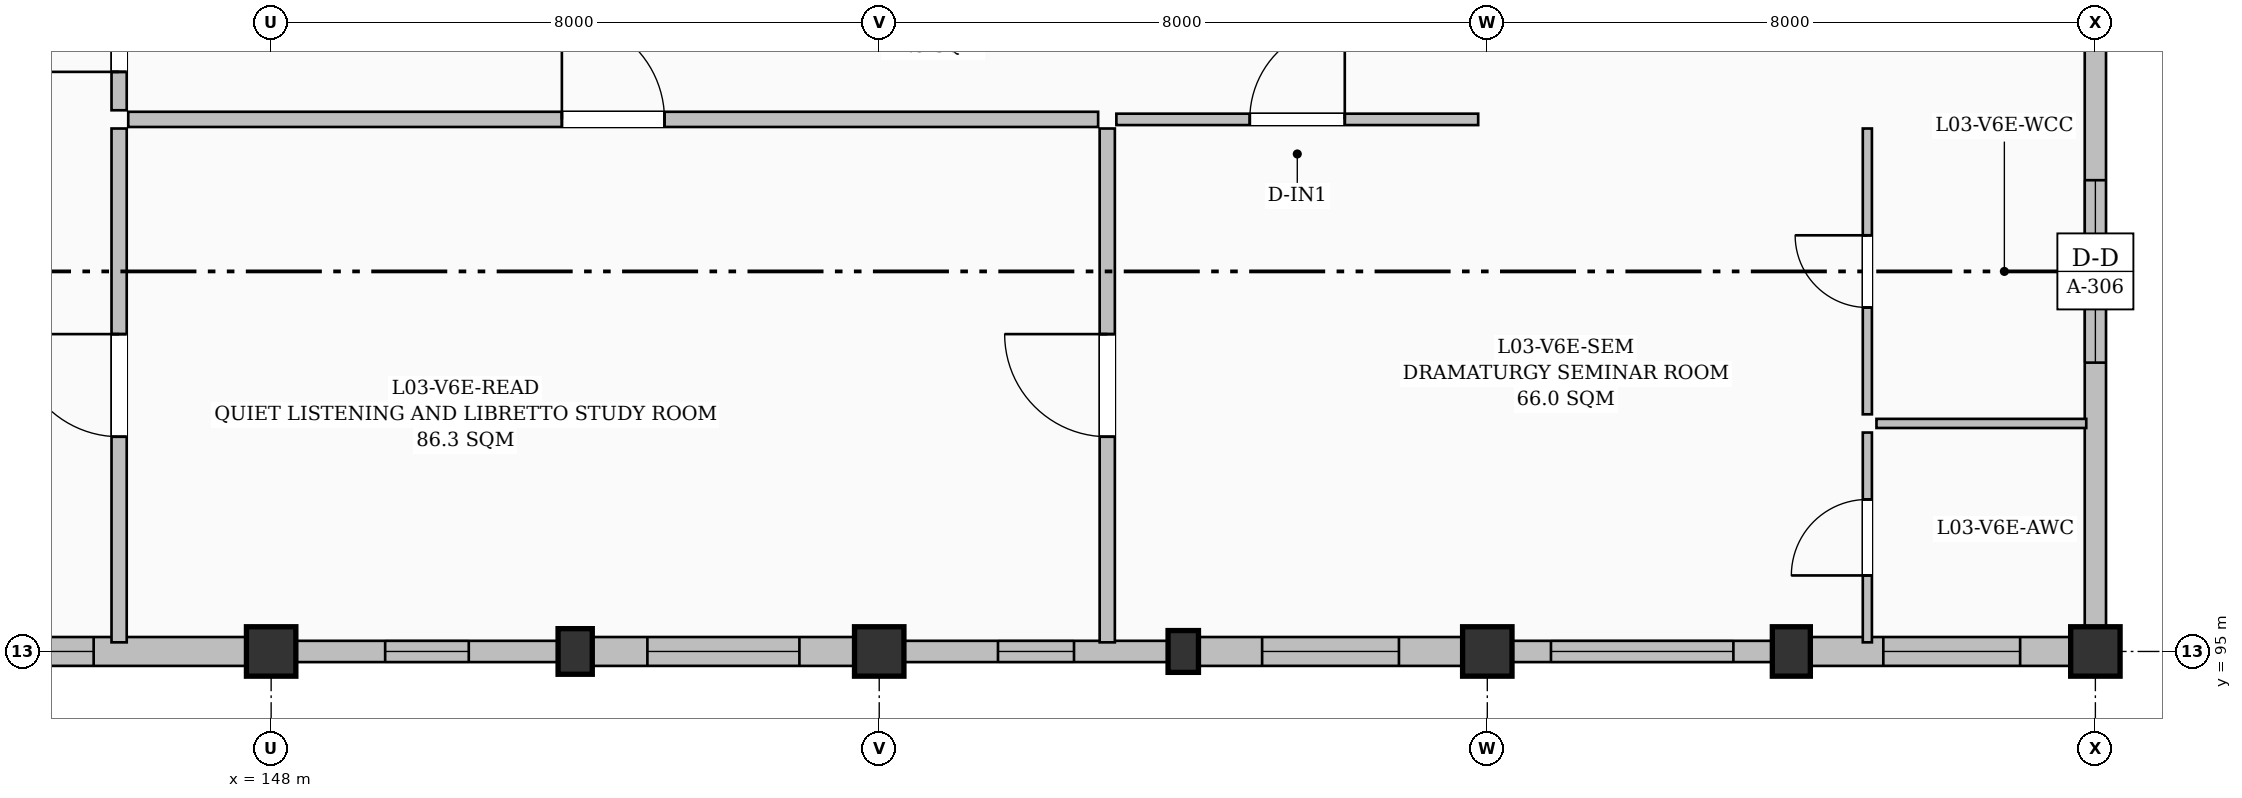
"""IFC4 building model, lengths in metres.
Left out: names, types, materials, properties, quantities, classifications, styles, units other than length and angle.
Written with IfcOpenShell. Run it as: python <this file> out.ifc"""

import sys

from ifc_helpers import new_model, si_unit, direction, frame, frame_2d, origin, origin_2d, place, context, subcontext, project, spatial, rectangle, extrude, element, fill, save


model = new_model("IFC4")
c1 = context("Model", 3, precision=1e-05, world=origin(), true_north=direction((0.0, 1.0)))
c2 = subcontext(c1, "Body", "Model", "MODEL_VIEW")
j1 = project(units=[si_unit("LENGTHUNIT", "METRE"), si_unit("PLANEANGLEUNIT", "RADIAN")], contexts=[c1])
p1 = place(None, origin())
s1 = spatial("IfcSite", under=j1, at=p1, CompositionType="ELEMENT")
p2 = place(p1, origin())
s2 = spatial("IfcBuilding", under=s1, at=p2, CompositionType="ELEMENT")
p3 = place(p2, frame((0.0, 0.0, 13.8)))
s3 = spatial("IfcBuildingStorey", under=s2, at=p3, CompositionType="ELEMENT", Elevation=13.8)
p4 = place(p3, frame((148.0, 95.0, 0.0), z_axis=(0.0, 0.0, 1.0), x_axis=(1.0, 0.0, 0.0)))
e1 = element("IfcColumn", 1, at=p4, inside=s3, PredefinedType="COLUMN", context=c2, shape_type="SweptSolid", body=[
    extrude(rectangle(XDim=0.65, YDim=0.65, at=origin_2d()), origin(), (0.0, 0.0, 1.0), 4.5),
])
p5 = place(p3, frame((152.0, 95.0, 0.0), z_axis=(0.0, 0.0, 1.0), x_axis=(1.0, 0.0, 0.0)))
e2 = element("IfcColumn", 2, at=p5, inside=s3, PredefinedType="PILASTER", context=c2, shape_type="SweptSolid", body=[
    extrude(rectangle(XDim=0.45, YDim=0.6, at=origin_2d()), origin(), (0.0, 0.0, 1.0), 4.5),
])
p6 = place(p3, frame((156.0, 95.0, 0.0), z_axis=(0.0, 0.0, 1.0), x_axis=(1.0, 0.0, 0.0)))
e3 = element("IfcColumn", 3, at=p6, inside=s3, PredefinedType="COLUMN", context=c2, shape_type="SweptSolid", body=[
    extrude(rectangle(XDim=0.65, YDim=0.65, at=origin_2d()), origin(), (0.0, 0.0, 1.0), 4.5),
])
p7 = place(p3, frame((160.0, 95.0, 0.0), z_axis=(0.0, 0.0, 1.0), x_axis=(1.0, 0.0, 0.0)))
e4 = element("IfcColumn", 4, at=p7, inside=s3, PredefinedType="PILASTER", context=c2, shape_type="SweptSolid", body=[
    extrude(rectangle(XDim=0.4, YDim=0.55, at=origin_2d()), origin(), (0.0, 0.0, 1.0), 4.5),
])
p8 = place(p3, frame((164.0, 95.0, 0.0), z_axis=(0.0, 0.0, 1.0), x_axis=(1.0, 0.0, 0.0)))
e5 = element("IfcColumn", 5, at=p8, inside=s3, PredefinedType="COLUMN", context=c2, shape_type="SweptSolid", body=[
    extrude(rectangle(XDim=0.65, YDim=0.65, at=origin_2d()), origin(), (0.0, 0.0, 1.0), 4.5),
])
p9 = place(p3, frame((168.0, 95.0, 0.0), z_axis=(0.0, 0.0, 1.0), x_axis=(1.0, 0.0, 0.0)))
e6 = element("IfcColumn", 6, at=p9, inside=s3, PredefinedType="PILASTER", context=c2, shape_type="SweptSolid", body=[
    extrude(rectangle(XDim=0.5, YDim=0.65, at=origin_2d()), origin(), (0.0, 0.0, 1.0), 4.5),
])
p10 = place(p3, frame((172.0, 95.0, 0.0), z_axis=(0.0, 0.0, 1.0), x_axis=(1.0, 0.0, 0.0)))
e7 = element("IfcColumn", 7, at=p10, inside=s3, PredefinedType="COLUMN", context=c2, shape_type="SweptSolid", body=[
    extrude(rectangle(XDim=0.65, YDim=0.65, at=origin_2d()), origin(), (0.0, 0.0, 1.0), 4.5),
])
p11 = place(p3, frame((172.0, 104.675, 0.0), z_axis=(0.0, 0.0, 1.0), x_axis=(0.0, -1.0, 0.0)))
e8 = element("IfcWall", 8, at=p11, inside=s3, PredefinedType="SOLIDWALL", context=c2, shape_type="SweptSolid", body=[
    extrude(rectangle(XDim=9.35, YDim=0.28, at=frame_2d((4.675, 0.0))), origin(), (0.0, 0.0, 1.0), 3.705),
])
p12 = place(p11, frame((3.475, 0.0, 0.95)))
e9 = element("IfcOpeningElement", 9, at=p12, cuts=e8, PredefinedType="OPENING", context=c2, shape_type="SweptSolid", body=[
    extrude(rectangle(XDim=2.4, YDim=1.8, at=frame_2d((1.2, 0.9))), frame((0.0, 0.15, 0.0), z_axis=(0.0, -1.0, 0.0), x_axis=(1.0, 0.0, 0.0)), (0.0, 0.0, 1.0), 0.3),
])
p13 = place(p3, frame((171.675, 95.0, 0.0), z_axis=(0.0, 0.0, 1.0), x_axis=(-1.0, 0.0, 0.0)))
e10 = element("IfcWall", 10, at=p13, inside=s3, PredefinedType="SOLIDWALL", context=c2, shape_type="SweptSolid", body=[
    extrude(rectangle(XDim=3.425, YDim=0.38, at=frame_2d((1.712, 0.0))), origin(), (0.0, 0.0, 1.0), 3.955),
])
p14 = place(p13, frame((0.665, 0.0, 0.95)))
e11 = element("IfcOpeningElement", 11, at=p14, cuts=e10, PredefinedType="OPENING", context=c2, shape_type="SweptSolid", body=[
    extrude(rectangle(XDim=1.8, YDim=1.8, at=frame_2d((0.9, 0.9))), frame((0.0, 0.2, 0.0), z_axis=(0.0, -1.0, 0.0), x_axis=(1.0, 0.0, 0.0)), (0.0, 0.0, 1.0), 0.4),
])
p15 = place(p3, frame((167.75, 95.0, 0.0), z_axis=(0.0, 0.0, 1.0), x_axis=(-1.0, 0.0, 0.0)))
e12 = element("IfcWall", 12, at=p15, inside=s3, PredefinedType="SOLIDWALL", context=c2, shape_type="SweptSolid", body=[
    extrude(rectangle(XDim=3.425, YDim=0.28, at=frame_2d((1.712, 0.0))), origin(), (0.0, 0.0, 1.0), 3.955),
])
p16 = place(p15, frame((0.512, 0.0, 0.95)))
e13 = element("IfcOpeningElement", 13, at=p16, cuts=e12, PredefinedType="OPENING", context=c2, shape_type="SweptSolid", body=[
    extrude(rectangle(XDim=2.4, YDim=1.8, at=frame_2d((1.2, 0.9))), frame((0.0, 0.15, 0.0), z_axis=(0.0, -1.0, 0.0), x_axis=(1.0, 0.0, 0.0)), (0.0, 0.0, 1.0), 0.3),
])
p17 = place(p3, frame((163.675, 95.0, 0.0), z_axis=(0.0, 0.0, 1.0), x_axis=(-1.0, 0.0, 0.0)))
e14 = element("IfcWall", 14, at=p17, inside=s3, PredefinedType="SOLIDWALL", context=c2, shape_type="SweptSolid", body=[
    extrude(rectangle(XDim=3.475, YDim=0.38, at=frame_2d((1.738, 0.0))), origin(), (0.0, 0.0, 1.0), 3.655),
])
p18 = place(p17, frame((0.837, 0.0, 0.95)))
e15 = element("IfcOpeningElement", 15, at=p18, cuts=e14, PredefinedType="OPENING", context=c2, shape_type="SweptSolid", body=[
    extrude(rectangle(XDim=1.8, YDim=1.5, at=frame_2d((0.9, 0.75))), frame((0.0, 0.2, 0.0), z_axis=(0.0, -1.0, 0.0), x_axis=(1.0, 0.0, 0.0)), (0.0, 0.0, 1.0), 0.4),
])
p19 = place(p3, frame((159.8, 95.0, 0.0), z_axis=(0.0, 0.0, 1.0), x_axis=(-1.0, 0.0, 0.0)))
e16 = element("IfcWall", 16, at=p19, inside=s3, PredefinedType="SOLIDWALL", context=c2, shape_type="SweptSolid", body=[
    extrude(rectangle(XDim=3.475, YDim=0.28, at=frame_2d((1.738, 0.0))), origin(), (0.0, 0.0, 1.0), 3.655),
])
p20 = place(p19, frame((1.238, 0.0, 0.95)))
e17 = element("IfcOpeningElement", 17, at=p20, cuts=e16, PredefinedType="OPENING", context=c2, shape_type="SweptSolid", body=[
    extrude(rectangle(XDim=1.0, YDim=1.4, at=frame_2d((0.5, 0.7))), frame((0.0, 0.15, 0.0), z_axis=(0.0, -1.0, 0.0), x_axis=(1.0, 0.0, 0.0)), (0.0, 0.0, 1.0), 0.3),
])
p21 = place(p3, frame((155.675, 95.0, 0.0), z_axis=(0.0, 0.0, 1.0), x_axis=(-1.0, 0.0, 0.0)))
e18 = element("IfcWall", 18, at=p21, inside=s3, PredefinedType="SOLIDWALL", context=c2, shape_type="SweptSolid", body=[
    extrude(rectangle(XDim=3.45, YDim=0.38, at=frame_2d((1.725, 0.0))), origin(), (0.0, 0.0, 1.0), 3.705),
])
p22 = place(p21, frame((0.725, 0.0, 0.95)))
e19 = element("IfcOpeningElement", 19, at=p22, cuts=e18, PredefinedType="OPENING", context=c2, shape_type="SweptSolid", body=[
    extrude(rectangle(XDim=2.0, YDim=1.2, at=frame_2d((1.0, 0.6))), frame((0.0, 0.2, 0.0), z_axis=(0.0, -1.0, 0.0), x_axis=(1.0, 0.0, 0.0)), (0.0, 0.0, 1.0), 0.4),
])
p23 = place(p3, frame((151.775, 95.0, 0.0), z_axis=(0.0, 0.0, 1.0), x_axis=(-1.0, 0.0, 0.0)))
e20 = element("IfcWall", 20, at=p23, inside=s3, PredefinedType="SOLIDWALL", context=c2, shape_type="SweptSolid", body=[
    extrude(rectangle(XDim=3.45, YDim=0.28, at=frame_2d((1.725, 0.0))), origin(), (0.0, 0.0, 1.0), 3.705),
])
p24 = place(p23, frame((1.175, 0.0, 0.95)))
e21 = element("IfcOpeningElement", 21, at=p24, cuts=e20, PredefinedType="OPENING", context=c2, shape_type="SweptSolid", body=[
    extrude(rectangle(XDim=1.1, YDim=2.0, at=frame_2d((0.55, 1.0))), frame((0.0, 0.15, 0.0), z_axis=(0.0, -1.0, 0.0), x_axis=(1.0, 0.0, 0.0)), (0.0, 0.0, 1.0), 0.3),
])
p25 = place(p3, frame((147.675, 95.0, 0.0), z_axis=(0.0, 0.0, 1.0), x_axis=(-1.0, 0.0, 0.0)))
e22 = element("IfcWall", 22, at=p25, inside=s3, PredefinedType="SOLIDWALL", context=c2, shape_type="SweptSolid", body=[
    extrude(rectangle(XDim=3.425, YDim=0.38, at=frame_2d((1.712, 0.0))), origin(), (0.0, 0.0, 1.0), 3.755),
])
p26 = place(p25, frame((2.01, 0.0, 0.95)))
e23 = element("IfcOpeningElement", 23, at=p26, cuts=e22, PredefinedType="OPENING", context=c2, shape_type="SweptSolid", body=[
    extrude(rectangle(XDim=1.1, YDim=2.0, at=frame_2d((0.55, 1.0))), frame((0.0, 0.2, 0.0), z_axis=(0.0, -1.0, 0.0), x_axis=(1.0, 0.0, 0.0)), (0.0, 0.0, 1.0), 0.4),
])
p27 = place(p3, frame((146.0, 95.12, 0.0), z_axis=(0.0, 0.0, 1.0), x_axis=(0.0, 1.0, 0.0)))
e24 = element("IfcWall", 24, at=p27, inside=s3, PredefinedType="PARTITIONING", context=c2, shape_type="SweptSolid", body=[
    extrude(rectangle(XDim=6.76, YDim=0.2, at=frame_2d((3.38, 0.0))), origin(), (0.0, 0.0, 1.0), 4.27),
])
p28 = place(p27, frame((2.705, 0.0, 0.0)))
e25 = element("IfcOpeningElement", 25, at=p28, cuts=e24, PredefinedType="OPENING", context=c2, shape_type="SweptSolid", body=[
    extrude(rectangle(XDim=1.35, YDim=2.2, at=frame_2d((0.675, 1.1))), frame((0.0, 0.11, 0.0), z_axis=(0.0, -1.0, 0.0), x_axis=(1.0, 0.0, 0.0)), (0.0, 0.0, 1.0), 0.22),
])
p29 = place(p3, frame((146.0, 102.12, 0.0), z_axis=(0.0, 0.0, 1.0), x_axis=(0.0, 1.0, 0.0)))
e26 = element("IfcWall", 26, at=p29, inside=s3, PredefinedType="PARTITIONING", context=c2, shape_type="SweptSolid", body=[
    extrude(rectangle(XDim=2.36, YDim=0.2, at=frame_2d((1.18, 0.0))), origin(), (0.0, 0.0, 1.0), 4.27),
])
p30 = place(p29, frame((0.505, 0.0, 0.0)))
e27 = element("IfcOpeningElement", 27, at=p30, cuts=e26, PredefinedType="OPENING", context=c2, shape_type="SweptSolid", body=[
    extrude(rectangle(XDim=1.35, YDim=2.2, at=frame_2d((0.675, 1.1))), frame((0.0, 0.11, 0.0), z_axis=(0.0, -1.0, 0.0), x_axis=(1.0, 0.0, 0.0)), (0.0, 0.0, 1.0), 0.22),
])
p31 = place(p3, frame((159.0, 95.12, 0.0), z_axis=(0.0, 0.0, 1.0), x_axis=(0.0, 1.0, 0.0)))
e28 = element("IfcWall", 28, at=p31, inside=s3, PredefinedType="PARTITIONING", context=c2, shape_type="SweptSolid", body=[
    extrude(rectangle(XDim=6.76, YDim=0.2, at=frame_2d((3.38, 0.0))), origin(), (0.0, 0.0, 1.0), 4.27),
])
p32 = place(p31, frame((2.705, 0.0, 0.0)))
e29 = element("IfcOpeningElement", 29, at=p32, cuts=e28, PredefinedType="OPENING", context=c2, shape_type="SweptSolid", body=[
    extrude(rectangle(XDim=1.35, YDim=2.2, at=frame_2d((0.675, 1.1))), frame((0.0, 0.11, 0.0), z_axis=(0.0, -1.0, 0.0), x_axis=(1.0, 0.0, 0.0)), (0.0, 0.0, 1.0), 0.22),
])
p33 = place(p3, frame((146.12, 102.0, 0.0), z_axis=(0.0, 0.0, 1.0), x_axis=(1.0, 0.0, 0.0)))
e30 = element("IfcWall", 30, at=p33, inside=s3, PredefinedType="PARTITIONING", context=c2, shape_type="SweptSolid", body=[
    extrude(rectangle(XDim=12.76, YDim=0.2, at=frame_2d((6.38, 0.0))), origin(), (0.0, 0.0, 1.0), 3.895),
])
p34 = place(p33, frame((5.705, 0.0, 0.0)))
e31 = element("IfcOpeningElement", 31, at=p34, cuts=e30, PredefinedType="OPENING", context=c2, shape_type="SweptSolid", body=[
    extrude(rectangle(XDim=1.35, YDim=2.2, at=frame_2d((0.675, 1.1))), frame((0.0, 0.11, 0.0), z_axis=(0.0, -1.0, 0.0), x_axis=(1.0, 0.0, 0.0)), (0.0, 0.0, 1.0), 0.22),
])
p35 = place(p3, frame((159.12, 102.0, 0.0), z_axis=(0.0, 0.0, 1.0), x_axis=(1.0, 0.0, 0.0)))
e32 = element("IfcWall", 32, at=p35, inside=s3, PredefinedType="PARTITIONING", context=c2, shape_type="SweptSolid", body=[
    extrude(rectangle(XDim=4.76, YDim=0.15, at=frame_2d((2.38, 0.0))), origin(), (0.0, 0.0, 1.0), 3.925),
])
p36 = place(p35, frame((1.755, 0.0, 0.0)))
e33 = element("IfcOpeningElement", 33, at=p36, cuts=e32, PredefinedType="OPENING", context=c2, shape_type="SweptSolid", body=[
    extrude(rectangle(XDim=1.25, YDim=2.15, at=frame_2d((0.625, 1.075))), frame((0.0, 0.085, 0.0), z_axis=(0.0, -1.0, 0.0), x_axis=(1.0, 0.0, 0.0)), (0.0, 0.0, 1.0), 0.17),
])
p37 = place(p3, frame((169.0, 95.12, 0.0), z_axis=(0.0, 0.0, 1.0), x_axis=(0.0, 1.0, 0.0)))
e34 = element("IfcWall", 34, at=p37, inside=s3, PredefinedType="PARTITIONING", context=c2, shape_type="SweptSolid", body=[
    extrude(rectangle(XDim=2.76, YDim=0.12, at=frame_2d((1.38, 0.0))), origin(), (0.0, 0.0, 1.0), 4.27),
])
p38 = place(p37, frame((0.88, 0.0, 0.0)))
e35 = element("IfcOpeningElement", 35, at=p38, cuts=e34, PredefinedType="OPENING", context=c2, shape_type="SweptSolid", body=[
    extrude(rectangle(XDim=1.0, YDim=2.1, at=frame_2d((0.5, 1.05))), frame((0.0, 0.07, 0.0), z_axis=(0.0, -1.0, 0.0), x_axis=(1.0, 0.0, 0.0)), (0.0, 0.0, 1.0), 0.14),
])
p39 = place(p3, frame((169.0, 98.12, 0.0), z_axis=(0.0, 0.0, 1.0), x_axis=(0.0, 1.0, 0.0)))
e36 = element("IfcWall", 36, at=p39, inside=s3, PredefinedType="PARTITIONING", context=c2, shape_type="SweptSolid", body=[
    extrude(rectangle(XDim=3.76, YDim=0.12, at=frame_2d((1.88, 0.0))), origin(), (0.0, 0.0, 1.0), 4.27),
])
p40 = place(p39, frame((1.405, 0.0, 0.0)))
e37 = element("IfcOpeningElement", 37, at=p40, cuts=e36, PredefinedType="OPENING", context=c2, shape_type="SweptSolid", body=[
    extrude(rectangle(XDim=0.95, YDim=2.1, at=frame_2d((0.475, 1.05))), frame((0.0, 0.07, 0.0), z_axis=(0.0, -1.0, 0.0), x_axis=(1.0, 0.0, 0.0)), (0.0, 0.0, 1.0), 0.14),
])
p41 = place(p3, frame((169.12, 98.0, 0.0), z_axis=(0.0, 0.0, 1.0), x_axis=(1.0, 0.0, 0.0)))
e38 = element("IfcWall", 38, at=p41, inside=s3, PredefinedType="PARTITIONING", context=c2, shape_type="SweptSolid", body=[
    extrude(rectangle(XDim=2.76, YDim=0.12, at=frame_2d((1.38, 0.0))), origin(), (0.0, 0.0, 1.0), 3.855),
])
p42 = place(p12, origin())
e39 = element("IfcWindow", 39, at=p42, inside=s3, PartitioningType="TRIPLE_PANEL_VERTICAL", PredefinedType="WINDOW", context=c2, shape_type="SweptSolid", body=[
    extrude(rectangle(XDim=2.4, YDim=1.8, at=frame_2d((1.2, 0.9))), frame((0.0, 0.03, 0.0), z_axis=(0.0, -1.0, 0.0), x_axis=(1.0, 0.0, 0.0)), (0.0, 0.0, 1.0), 0.06),
])
fill(e9, e39)
p43 = place(p14, origin())
e40 = element("IfcWindow", 40, at=p43, inside=s3, PartitioningType="DOUBLE_PANEL_VERTICAL", PredefinedType="WINDOW", context=c2, shape_type="SweptSolid", body=[
    extrude(rectangle(XDim=1.8, YDim=1.8, at=frame_2d((0.9, 0.9))), frame((0.0, 0.03, 0.0), z_axis=(0.0, -1.0, 0.0), x_axis=(1.0, 0.0, 0.0)), (0.0, 0.0, 1.0), 0.06),
])
fill(e11, e40)
p44 = place(p16, origin())
e41 = element("IfcWindow", 41, at=p44, inside=s3, PartitioningType="TRIPLE_PANEL_VERTICAL", PredefinedType="WINDOW", context=c2, shape_type="SweptSolid", body=[
    extrude(rectangle(XDim=2.4, YDim=1.8, at=frame_2d((1.2, 0.9))), frame((0.0, 0.03, 0.0), z_axis=(0.0, -1.0, 0.0), x_axis=(1.0, 0.0, 0.0)), (0.0, 0.0, 1.0), 0.06),
])
fill(e13, e41)
p45 = place(p18, origin())
e42 = element("IfcWindow", 42, at=p45, inside=s3, PartitioningType="DOUBLE_PANEL_VERTICAL", PredefinedType="WINDOW", context=c2, shape_type="SweptSolid", body=[
    extrude(rectangle(XDim=1.8, YDim=1.5, at=frame_2d((0.9, 0.75))), frame((0.0, 0.03, 0.0), z_axis=(0.0, -1.0, 0.0), x_axis=(1.0, 0.0, 0.0)), (0.0, 0.0, 1.0), 0.06),
])
fill(e15, e42)
p46 = place(p20, origin())
e43 = element("IfcWindow", 43, at=p46, inside=s3, PartitioningType="SINGLE_PANEL", PredefinedType="WINDOW", context=c2, shape_type="SweptSolid", body=[
    extrude(rectangle(XDim=1.0, YDim=1.4, at=frame_2d((0.5, 0.7))), frame((0.0, 0.03, 0.0), z_axis=(0.0, -1.0, 0.0), x_axis=(1.0, 0.0, 0.0)), (0.0, 0.0, 1.0), 0.06),
])
fill(e17, e43)
p47 = place(p22, origin())
e44 = element("IfcWindow", 44, at=p47, inside=s3, PartitioningType="DOUBLE_PANEL_HORIZONTAL", PredefinedType="WINDOW", context=c2, shape_type="SweptSolid", body=[
    extrude(rectangle(XDim=2.0, YDim=1.2, at=frame_2d((1.0, 0.6))), frame((0.0, 0.03, 0.0), z_axis=(0.0, -1.0, 0.0), x_axis=(1.0, 0.0, 0.0)), (0.0, 0.0, 1.0), 0.06),
])
fill(e19, e44)
p48 = place(p24, origin())
e45 = element("IfcWindow", 45, at=p48, inside=s3, PartitioningType="SINGLE_PANEL", PredefinedType="WINDOW", context=c2, shape_type="SweptSolid", body=[
    extrude(rectangle(XDim=1.1, YDim=2.0, at=frame_2d((0.55, 1.0))), frame((0.0, 0.03, 0.0), z_axis=(0.0, -1.0, 0.0), x_axis=(1.0, 0.0, 0.0)), (0.0, 0.0, 1.0), 0.06),
])
fill(e21, e45)
p49 = place(p26, origin())
e46 = element("IfcWindow", 46, at=p49, inside=s3, PartitioningType="DOUBLE_PANEL_VERTICAL", PredefinedType="WINDOW", context=c2, shape_type="SweptSolid", body=[
    extrude(rectangle(XDim=1.1, YDim=2.0, at=frame_2d((0.55, 1.0))), frame((0.0, 0.03, 0.0), z_axis=(0.0, -1.0, 0.0), x_axis=(1.0, 0.0, 0.0)), (0.0, 0.0, 1.0), 0.06),
])
fill(e23, e46)
p50 = place(p28, origin())
e47 = element("IfcDoor", 47, at=p50, inside=s3, OperationType="SINGLE_SWING_RIGHT", PredefinedType="DOOR", context=c2, shape_type="SweptSolid", body=[
    extrude(rectangle(XDim=1.35, YDim=2.2, at=frame_2d((0.675, 1.1))), frame((0.0, 0.025, 0.0), z_axis=(0.0, -1.0, 0.0), x_axis=(1.0, 0.0, 0.0)), (0.0, 0.0, 1.0), 0.05),
])
fill(e25, e47)
p51 = place(p30, origin())
e48 = element("IfcDoor", 48, at=p51, inside=s3, OperationType="SINGLE_SWING_LEFT", PredefinedType="DOOR", context=c2, shape_type="SweptSolid", body=[
    extrude(rectangle(XDim=1.35, YDim=2.2, at=frame_2d((0.675, 1.1))), frame((0.0, 0.025, 0.0), z_axis=(0.0, -1.0, 0.0), x_axis=(1.0, 0.0, 0.0)), (0.0, 0.0, 1.0), 0.05),
])
fill(e27, e48)
p52 = place(p32, origin())
e49 = element("IfcDoor", 49, at=p52, inside=s3, OperationType="SINGLE_SWING_RIGHT", PredefinedType="DOOR", context=c2, shape_type="SweptSolid", body=[
    extrude(rectangle(XDim=1.35, YDim=2.2, at=frame_2d((0.675, 1.1))), frame((0.0, 0.025, 0.0), z_axis=(0.0, -1.0, 0.0), x_axis=(1.0, 0.0, 0.0)), (0.0, 0.0, 1.0), 0.05),
])
fill(e29, e49)
p53 = place(p34, origin())
e50 = element("IfcDoor", 50, at=p53, inside=s3, OperationType="SINGLE_SWING_LEFT", PredefinedType="DOOR", context=c2, shape_type="SweptSolid", body=[
    extrude(rectangle(XDim=1.35, YDim=2.2, at=frame_2d((0.675, 1.1))), frame((0.0, 0.025, 0.0), z_axis=(0.0, -1.0, 0.0), x_axis=(1.0, 0.0, 0.0)), (0.0, 0.0, 1.0), 0.05),
])
fill(e31, e50)
p54 = place(p36, origin())
e51 = element("IfcDoor", 51, at=p54, inside=s3, OperationType="SINGLE_SWING_RIGHT", PredefinedType="DOOR", context=c2, shape_type="SweptSolid", body=[
    extrude(rectangle(XDim=1.25, YDim=2.15, at=frame_2d((0.625, 1.075))), frame((0.0, 0.025, 0.0), z_axis=(0.0, -1.0, 0.0), x_axis=(1.0, 0.0, 0.0)), (0.0, 0.0, 1.0), 0.05),
])
fill(e33, e51)
p55 = place(p38, origin())
e52 = element("IfcDoor", 52, at=p55, inside=s3, OperationType="SINGLE_SWING_LEFT", PredefinedType="DOOR", context=c2, shape_type="SweptSolid", body=[
    extrude(rectangle(XDim=1.0, YDim=2.1, at=frame_2d((0.5, 1.05))), frame((0.0, 0.025, 0.0), z_axis=(0.0, -1.0, 0.0), x_axis=(1.0, 0.0, 0.0)), (0.0, 0.0, 1.0), 0.05),
])
fill(e35, e52)
p56 = place(p40, origin())
e53 = element("IfcDoor", 53, at=p56, inside=s3, OperationType="SINGLE_SWING_RIGHT", PredefinedType="DOOR", context=c2, shape_type="SweptSolid", body=[
    extrude(rectangle(XDim=0.95, YDim=2.1, at=frame_2d((0.475, 1.05))), frame((0.0, 0.025, 0.0), z_axis=(0.0, -1.0, 0.0), x_axis=(1.0, 0.0, 0.0)), (0.0, 0.0, 1.0), 0.05),
])
fill(e37, e53)
save(model, sys.argv[1])
